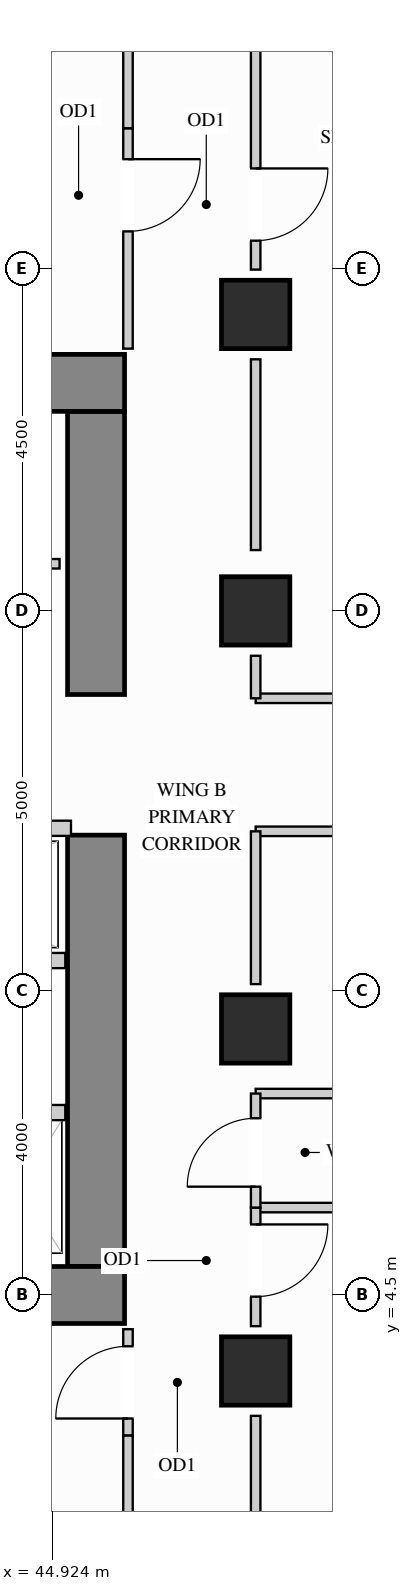
"""IFC4 building model, lengths in metres.
Left out: names, types, materials, properties, quantities, classifications, styles, units other than length and angle.
Written with IfcOpenShell. Run it as: python <this file> out.ifc"""

import sys

from ifc_helpers import new_model, si_unit, direction, frame, frame_2d, origin, origin_2d, place, context, subcontext, project, spatial, rectangle, extrude, source, transform, mapped, element, fill, save


model = new_model("IFC4")
c1 = context("Model", 3, precision=1e-05, world=origin(), true_north=direction((0.0, 1.0)))
c2 = subcontext(c1, "Body", "Model", "MODEL_VIEW")
j1 = project(units=[si_unit("LENGTHUNIT", "METRE"), si_unit("PLANEANGLEUNIT", "RADIAN")], contexts=[c1])
p1 = place(None, origin())
s1 = spatial("IfcSite", under=j1, at=p1, CompositionType="ELEMENT")
p2 = place(p1, origin())
s2 = spatial("IfcBuilding", under=s1, at=p2, CompositionType="ELEMENT")
p3 = place(p2, frame((0.0, 0.0, 127.8)))
s3 = spatial("IfcBuildingStorey", under=s2, at=p3, CompositionType="ELEMENT", Elevation=127.8)
m1 = source(origin(), c2, "Body", "SweptSolid", [
    extrude(rectangle(XDim=0.9, YDim=0.9, at=origin_2d()), origin(), (0.0, 0.0, 1.0), 3.38),
])
for number, where, z_axis, x_axis in (
    (1, (47.6, 13.5, 0.0), (0.0, 0.0, 1.0), (1.0, 0.0, 0.0)),
    (2, (47.6, 3.5, 0.0), (0.0, 0.0, 1.0), (1.0, 0.0, 0.0)),
    (3, (47.6, 8.0, 0.0), (0.0, 0.0, 1.0), (1.0, 0.0, 0.0)),
    (4, (47.6, 17.4, 0.0), (0.0, 0.0, 1.0), (1.0, 0.0, 0.0)),
):
    element("IfcColumn", number, at=place(p3, frame(where, z_axis=z_axis, x_axis=x_axis)), inside=s3, PredefinedType="COLUMN", context=c2, shape_type="MappedRepresentation", body=[
        mapped(m1, transform((0.0, 0.0, 0.0), x_axis=(1.0, 0.0, 0.0), y_axis=(0.0, 1.0, 0.0), z_axis=(0.0, 0.0, 1.0))),
    ])
m2 = source(origin(), c2, "Body", "SweptSolid", [
    extrude(rectangle(XDim=5.675, YDim=0.75, at=frame_2d((2.837, 0.0))), origin(), (0.0, 0.0, 1.0), 3.38),
])
p4 = place(p3, frame((45.5, 4.875, 0.0), z_axis=(0.0, 0.0, 1.0), x_axis=(0.0, 1.0, 0.0)))
e5 = element("IfcWall", 5, at=p4, inside=s3, PredefinedType="SHEAR", context=c2, shape_type="MappedRepresentation", body=[
    mapped(m2, transform((0.0, 0.0, 0.0), x_axis=(1.0, 0.0, 0.0), y_axis=(0.0, 1.0, 0.0), z_axis=(0.0, 0.0, 1.0))),
])
m3 = source(origin(), c2, "Body", "SweptSolid", [
    extrude(rectangle(XDim=3.725, YDim=0.75, at=frame_2d((1.863, 0.0))), origin(), (0.0, 0.0, 1.0), 3.38),
])
p5 = place(p3, frame((45.5, 12.4, 0.0), z_axis=(0.0, 0.0, 1.0), x_axis=(0.0, 1.0, 0.0)))
e6 = element("IfcWall", 6, at=p5, inside=s3, PredefinedType="SHEAR", context=c2, shape_type="MappedRepresentation", body=[
    mapped(m3, transform((0.0, 0.0, 0.0), x_axis=(1.0, 0.0, 0.0), y_axis=(0.0, 1.0, 0.0), z_axis=(0.0, 0.0, 1.0))),
])
m4 = source(origin(), c2, "Body", "SweptSolid", [
    extrude(rectangle(XDim=10.25, YDim=0.75, at=frame_2d((5.125, 0.0))), origin(), (0.0, 0.0, 1.0), 3.38),
])
for number, where, z_axis, x_axis in (
    (7, (35.625, 16.5, 0.0), (0.0, 0.0, 1.0), (1.0, 0.0, 0.0)),
    (8, (35.625, 4.5, 0.0), (0.0, 0.0, 1.0), (1.0, 0.0, 0.0)),
):
    element("IfcWall", number, at=place(p3, frame(where, z_axis=z_axis, x_axis=x_axis)), inside=s3, PredefinedType="SHEAR", context=c2, shape_type="MappedRepresentation", body=[
        mapped(m4, transform((0.0, 0.0, 0.0), x_axis=(1.0, 0.0, 0.0), y_axis=(0.0, 1.0, 0.0), z_axis=(0.0, 0.0, 1.0))),
    ])
p6 = place(p3, frame((40.75, 14.12, 0.0), z_axis=(0.0, 0.0, 1.0), x_axis=(1.0, 0.0, 0.0)))
e9 = element("IfcWall", 9, at=p6, inside=s3, PredefinedType="PARTITIONING", context=c2, shape_type="SweptSolid", body=[
    extrude(rectangle(XDim=4.27, YDim=0.125, at=frame_2d((2.135, 0.0))), origin(), (0.0, 0.0, 1.0), 3.365),
])
p7 = place(p6, frame((1.66, 0.0, 0.0)))
e10 = element("IfcOpeningElement", 10, at=p7, cuts=e9, PredefinedType="OPENING", context=c2, shape_type="SweptSolid", body=[
    extrude(rectangle(XDim=0.95, YDim=2.15, at=frame_2d((0.475, 1.075))), frame((0.0, 0.073, 0.0), z_axis=(0.0, -1.0, 0.0), x_axis=(1.0, 0.0, 0.0)), (0.0, 0.0, 1.0), 0.145),
])
m5 = source(origin(), c2, "Body", "SweptSolid", [
    extrude(rectangle(XDim=8.048, YDim=0.125, at=frame_2d((4.024, 0.0))), origin(), (0.0, 0.0, 1.0), 3.365),
])
for number, where, z_axis, x_axis in (
    (11, (47.6, 5.65, 0.0), (0.0, 0.0, 1.0), (1.0, 0.0, 0.0)),
    (12, (47.6, 7.15, 0.0), (0.0, 0.0, 1.0), (1.0, 0.0, 0.0)),
):
    element("IfcWall", number, at=place(p3, frame(where, z_axis=z_axis, x_axis=x_axis)), inside=s3, PredefinedType="PARTITIONING", context=c2, shape_type="MappedRepresentation", body=[
        mapped(m5, transform((0.0, 0.0, 0.0), x_axis=(1.0, 0.0, 0.0), y_axis=(0.0, 1.0, 0.0), z_axis=(0.0, 0.0, 1.0))),
    ])
m6 = source(origin(), c2, "Body", "SweptSolid", [
    extrude(rectangle(XDim=3.8, YDim=0.125, at=frame_2d((1.9, 0.0))), origin(), (0.0, 0.0, 1.0), 3.365),
])
p8 = place(p3, frame((47.6, 12.35, 0.0), z_axis=(0.0, 0.0, 1.0), x_axis=(1.0, 0.0, 0.0)))
e13 = element("IfcWall", 13, at=p8, inside=s3, PredefinedType="PARTITIONING", context=c2, shape_type="MappedRepresentation", body=[
    mapped(m6, transform((0.0, 0.0, 0.0), x_axis=(1.0, 0.0, 0.0), y_axis=(0.0, 1.0, 0.0), z_axis=(0.0, 0.0, 1.0))),
])
p9 = place(p3, frame((47.6, 10.6, 0.0), z_axis=(0.0, 0.0, 1.0), x_axis=(1.0, 0.0, 0.0)))
e14 = element("IfcWall", 14, at=p9, inside=s3, PredefinedType="PARTITIONING", context=c2, shape_type="SweptSolid", body=[
    extrude(rectangle(XDim=3.8, YDim=0.125, at=frame_2d((1.9, 0.0))), origin(), (0.0, 0.0, 1.0), 2.677),
])
p10 = place(p9, frame((1.425, 0.0, 0.0)))
e15 = element("IfcOpeningElement", 15, at=p10, cuts=e14, PredefinedType="OPENING", context=c2, shape_type="SweptSolid", body=[
    extrude(rectangle(XDim=0.95, YDim=2.15, at=frame_2d((0.475, 1.075))), frame((0.0, 0.073, 0.0), z_axis=(0.0, -1.0, 0.0), x_axis=(1.0, 0.0, 0.0)), (0.0, 0.0, 1.0), 0.145),
])
p11 = place(p3, frame((47.6, 4.09, 0.0), z_axis=(0.0, 0.0, 1.0), x_axis=(0.0, 1.0, 0.0)))
e16 = element("IfcWall", 16, at=p11, inside=s3, PredefinedType="PARTITIONING", context=c2, shape_type="SweptSolid", body=[
    extrude(rectangle(XDim=1.56, YDim=0.125, at=frame_2d((0.78, 0.0))), origin(), (0.0, 0.0, 1.0), 2.677),
])
p12 = place(p11, frame((0.388, 0.0, 0.0)))
e17 = element("IfcOpeningElement", 17, at=p12, cuts=e16, PredefinedType="OPENING", context=c2, shape_type="SweptSolid", body=[
    extrude(rectangle(XDim=0.95, YDim=2.15, at=frame_2d((0.475, 1.075))), frame((0.0, 0.073, 0.0), z_axis=(0.0, -1.0, 0.0), x_axis=(1.0, 0.0, 0.0)), (0.0, 0.0, 1.0), 0.145),
])
m7 = source(origin(), c2, "Body", "SweptSolid", [
    extrude(rectangle(XDim=1.72, YDim=0.125, at=frame_2d((0.86, 0.0))), origin(), (0.0, 0.0, 1.0), 2.677),
])
p13 = place(p3, frame((47.6, 1.19, 0.0), z_axis=(0.0, 0.0, 1.0), x_axis=(0.0, 1.0, 0.0)))
e18 = element("IfcWall", 18, at=p13, inside=s3, PredefinedType="PARTITIONING", context=c2, shape_type="MappedRepresentation", body=[
    mapped(m7, transform((0.0, 0.0, 0.0), x_axis=(1.0, 0.0, 0.0), y_axis=(0.0, 1.0, 0.0), z_axis=(0.0, 0.0, 1.0))),
])
m8 = source(origin(), c2, "Body", "SweptSolid", [
    extrude(rectangle(XDim=2.01, YDim=0.125, at=frame_2d((1.005, 0.0))), origin(), (0.0, 0.0, 1.0), 2.677),
])
p14 = place(p3, frame((47.6, 8.59, 0.0), z_axis=(0.0, 0.0, 1.0), x_axis=(0.0, 1.0, 0.0)))
e19 = element("IfcWall", 19, at=p14, inside=s3, PredefinedType="PARTITIONING", context=c2, shape_type="MappedRepresentation", body=[
    mapped(m8, transform((0.0, 0.0, 0.0), x_axis=(1.0, 0.0, 0.0), y_axis=(0.0, 1.0, 0.0), z_axis=(0.0, 0.0, 1.0))),
])
m9 = source(origin(), c2, "Body", "SweptSolid", [
    extrude(rectangle(XDim=2.51, YDim=0.125, at=frame_2d((1.255, 0.0))), origin(), (0.0, 0.0, 1.0), 2.677),
])
p15 = place(p3, frame((47.6, 14.3, 0.0), z_axis=(0.0, 0.0, 1.0), x_axis=(0.0, 1.0, 0.0)))
e20 = element("IfcWall", 20, at=p15, inside=s3, PredefinedType="PARTITIONING", context=c2, shape_type="MappedRepresentation", body=[
    mapped(m9, transform((0.0, 0.0, 0.0), x_axis=(1.0, 0.0, 0.0), y_axis=(0.0, 1.0, 0.0), z_axis=(0.0, 0.0, 1.0))),
])
p16 = place(p3, frame((47.6, 17.99, 0.0), z_axis=(0.0, 0.0, 1.0), x_axis=(0.0, 1.0, 0.0)))
e21 = element("IfcWall", 21, at=p16, inside=s3, PredefinedType="PARTITIONING", context=c2, shape_type="SweptSolid", body=[
    extrude(rectangle(XDim=3.32, YDim=0.125, at=frame_2d((1.66, 0.0))), origin(), (0.0, 0.0, 1.0), 2.677),
])
p17 = place(p16, frame((0.381, 0.0, 0.0)))
e22 = element("IfcOpeningElement", 22, at=p17, cuts=e21, PredefinedType="OPENING", context=c2, shape_type="SweptSolid", body=[
    extrude(rectangle(XDim=0.95, YDim=2.15, at=frame_2d((0.475, 1.075))), frame((0.0, 0.073, 0.0), z_axis=(0.0, -1.0, 0.0), x_axis=(1.0, 0.0, 0.0)), (0.0, 0.0, 1.0), 0.145),
])
m10 = source(origin(), c2, "Body", "SweptSolid", [
    extrude(rectangle(XDim=0.56, YDim=0.125, at=frame_2d((0.28, 0.0))), origin(), (0.0, 0.0, 1.0), 2.677),
])
p18 = place(p3, frame((47.6, 12.35, 0.0), z_axis=(0.0, 0.0, 1.0), x_axis=(0.0, 1.0, 0.0)))
e23 = element("IfcWall", 23, at=p18, inside=s3, PredefinedType="PARTITIONING", context=c2, shape_type="MappedRepresentation", body=[
    mapped(m10, transform((0.0, 0.0, 0.0), x_axis=(1.0, 0.0, 0.0), y_axis=(0.0, 1.0, 0.0), z_axis=(0.0, 0.0, 1.0))),
])
p19 = place(p3, frame((47.6, 5.65, 0.0), z_axis=(0.0, 0.0, 1.0), x_axis=(0.0, 1.0, 0.0)))
e24 = element("IfcWall", 24, at=p19, inside=s3, PredefinedType="PARTITIONING", context=c2, shape_type="SweptSolid", body=[
    extrude(rectangle(XDim=1.5, YDim=0.125, at=frame_2d((0.75, 0.0))), origin(), (0.0, 0.0, 1.0), 2.677),
])
p20 = place(p19, frame((0.275, 0.0, 0.0)))
e25 = element("IfcOpeningElement", 25, at=p20, cuts=e24, PredefinedType="OPENING", context=c2, shape_type="SweptSolid", body=[
    extrude(rectangle(XDim=0.9, YDim=2.15, at=frame_2d((0.45, 1.075))), frame((0.0, 0.073, 0.0), z_axis=(0.0, -1.0, 0.0), x_axis=(1.0, 0.0, 0.0)), (0.0, 0.0, 1.0), 0.145),
])
p21 = place(p3, frame((45.92, 16.95, 0.0), z_axis=(0.0, 0.0, 1.0), x_axis=(0.0, 1.0, 0.0)))
e26 = element("IfcWall", 26, at=p21, inside=s3, PredefinedType="PARTITIONING", context=c2, shape_type="SweptSolid", body=[
    extrude(rectangle(XDim=2.9, YDim=0.125, at=frame_2d((1.45, 0.0))), origin(), (0.0, 0.0, 1.0), 3.365),
])
p22 = place(p21, frame((1.543, 0.0, 0.0)))
e27 = element("IfcOpeningElement", 27, at=p22, cuts=e26, PredefinedType="OPENING", context=c2, shape_type="SweptSolid", body=[
    extrude(rectangle(XDim=0.95, YDim=2.15, at=frame_2d((0.475, 1.075))), frame((0.0, 0.073, 0.0), z_axis=(0.0, -1.0, 0.0), x_axis=(1.0, 0.0, 0.0)), (0.0, 0.0, 1.0), 0.145),
])
m11 = source(origin(), c2, "Body", "SweptSolid", [
    extrude(rectangle(XDim=2.298, YDim=0.125, at=frame_2d((1.149, 0.0))), origin(), (0.0, 0.0, 1.0), 3.365),
])
p23 = place(p3, frame((45.92, 19.85, 0.0), z_axis=(0.0, 0.0, 1.0), x_axis=(0.0, 1.0, 0.0)))
e28 = element("IfcWall", 28, at=p23, inside=s3, PredefinedType="PARTITIONING", context=c2, shape_type="MappedRepresentation", body=[
    mapped(m11, transform((0.0, 0.0, 0.0), x_axis=(1.0, 0.0, 0.0), y_axis=(0.0, 1.0, 0.0), z_axis=(0.0, 0.0, 1.0))),
])
p24 = place(p3, frame((45.92, 2.65, 0.0), z_axis=(0.0, 0.0, 1.0), x_axis=(0.0, 1.0, 0.0)))
e29 = element("IfcWall", 29, at=p24, inside=s3, PredefinedType="PARTITIONING", context=c2, shape_type="SweptSolid", body=[
    extrude(rectangle(XDim=1.4, YDim=0.125, at=frame_2d((0.7, 0.0))), origin(), (0.0, 0.0, 1.0), 3.365),
])
p25 = place(p24, frame((0.225, 0.0, 0.0)))
e30 = element("IfcOpeningElement", 30, at=p25, cuts=e29, PredefinedType="OPENING", context=c2, shape_type="SweptSolid", body=[
    extrude(rectangle(XDim=0.95, YDim=2.15, at=frame_2d((0.475, 1.075))), frame((0.0, 0.073, 0.0), z_axis=(0.0, -1.0, 0.0), x_axis=(1.0, 0.0, 0.0)), (0.0, 0.0, 1.0), 0.145),
])
p26 = place(p3, frame((45.92, 0.352, 0.0), z_axis=(0.0, 0.0, 1.0), x_axis=(0.0, 1.0, 0.0)))
e31 = element("IfcWall", 31, at=p26, inside=s3, PredefinedType="PARTITIONING", context=c2, shape_type="MappedRepresentation", body=[
    mapped(m11, transform((0.0, 0.0, 0.0), x_axis=(1.0, 0.0, 0.0), y_axis=(0.0, 1.0, 0.0), z_axis=(0.0, 0.0, 1.0))),
])
m12 = source(origin(), c2, "Body", "SweptSolid", [
    extrude(rectangle(XDim=1.245, YDim=0.2, at=frame_2d((0.623, 0.0))), origin(), (0.0, 0.0, 1.0), 3.365),
])
p27 = place(p3, frame((43.85, 6.9, 0.0), z_axis=(0.0, 0.0, 1.0), x_axis=(1.0, 0.0, 0.0)))
e32 = element("IfcWall", 32, at=p27, inside=s3, PredefinedType="PARTITIONING", context=c2, shape_type="MappedRepresentation", body=[
    mapped(m12, transform((0.0, 0.0, 0.0), x_axis=(1.0, 0.0, 0.0), y_axis=(0.0, 1.0, 0.0), z_axis=(0.0, 0.0, 1.0))),
])
m13 = source(origin(), c2, "Body", "SweptSolid", [
    extrude(rectangle(XDim=3.49, YDim=0.2, at=frame_2d((1.745, 0.0))), origin(), (0.0, 0.0, 1.0), 3.365),
])
p28 = place(p3, frame((41.68, 10.64, 0.0), z_axis=(0.0, 0.0, 1.0), x_axis=(1.0, 0.0, 0.0)))
e33 = element("IfcWall", 33, at=p28, inside=s3, PredefinedType="PARTITIONING", context=c2, shape_type="MappedRepresentation", body=[
    mapped(m13, transform((0.0, 0.0, 0.0), x_axis=(1.0, 0.0, 0.0), y_axis=(0.0, 1.0, 0.0), z_axis=(0.0, 0.0, 1.0))),
])
m14 = source(origin(), c2, "Body", "SweptSolid", [
    extrude(rectangle(XDim=3.415, YDim=0.2, at=frame_2d((1.708, 0.0))), origin(), (0.0, 0.0, 1.0), 3.365),
])
p29 = place(p3, frame((41.68, 8.9, 0.0), z_axis=(0.0, 0.0, 1.0), x_axis=(1.0, 0.0, 0.0)))
e34 = element("IfcWall", 34, at=p29, inside=s3, PredefinedType="PARTITIONING", context=c2, shape_type="MappedRepresentation", body=[
    mapped(m14, transform((0.0, 0.0, 0.0), x_axis=(1.0, 0.0, 0.0), y_axis=(0.0, 1.0, 0.0), z_axis=(0.0, 0.0, 1.0))),
])
m15 = source(origin(), c2, "Body", "SweptSolid", [
    extrude(rectangle(XDim=0.95, YDim=2.15, at=frame_2d((0.475, 1.075))), frame((0.0, 0.025, 0.0), z_axis=(0.0, -1.0, 0.0), x_axis=(1.0, 0.0, 0.0)), (0.0, 0.0, 1.0), 0.05),
])
p30 = place(p22, origin())
e35 = element("IfcDoor", 35, at=p30, inside=s3, OperationType="SINGLE_SWING_RIGHT", PredefinedType="DOOR", context=c2, shape_type="MappedRepresentation", body=[
    mapped(m15, transform((0.0, 0.0, 0.0), x_axis=(1.0, 0.0, 0.0), y_axis=(0.0, 1.0, 0.0), z_axis=(0.0, 0.0, 1.0))),
])
fill(e27, e35)
p31 = place(p25, origin())
e36 = element("IfcDoor", 36, at=p31, inside=s3, OperationType="SINGLE_SWING_LEFT", PredefinedType="DOOR", context=c2, shape_type="MappedRepresentation", body=[
    mapped(m15, transform((0.0, 0.0, 0.0), x_axis=(1.0, 0.0, 0.0), y_axis=(0.0, 1.0, 0.0), z_axis=(0.0, 0.0, 1.0))),
])
fill(e30, e36)
p32 = place(p12, origin())
e37 = element("IfcDoor", 37, at=p32, inside=s3, OperationType="SINGLE_SWING_RIGHT", PredefinedType="DOOR", context=c2, shape_type="MappedRepresentation", body=[
    mapped(m15, transform((0.0, 0.0, 0.0), x_axis=(1.0, 0.0, 0.0), y_axis=(0.0, 1.0, 0.0), z_axis=(0.0, 0.0, 1.0))),
])
fill(e17, e37)
p33 = place(p17, origin())
e38 = element("IfcDoor", 38, at=p33, inside=s3, OperationType="SINGLE_SWING_RIGHT", PredefinedType="DOOR", context=c2, shape_type="MappedRepresentation", body=[
    mapped(m15, transform((0.0, 0.0, 0.0), x_axis=(1.0, 0.0, 0.0), y_axis=(0.0, 1.0, 0.0), z_axis=(0.0, 0.0, 1.0))),
])
fill(e22, e38)
m16 = source(origin(), c2, "Body", "SweptSolid", [
    extrude(rectangle(XDim=0.9, YDim=2.15, at=frame_2d((0.45, 1.075))), frame((0.0, 0.025, 0.0), z_axis=(0.0, -1.0, 0.0), x_axis=(1.0, 0.0, 0.0)), (0.0, 0.0, 1.0), 0.05),
])
p34 = place(p20, origin())
e39 = element("IfcDoor", 39, at=p34, inside=s3, OperationType="SINGLE_SWING_LEFT", PredefinedType="DOOR", context=c2, shape_type="MappedRepresentation", body=[
    mapped(m16, transform((0.0, 0.0, 0.0), x_axis=(1.0, 0.0, 0.0), y_axis=(0.0, 1.0, 0.0), z_axis=(0.0, 0.0, 1.0))),
])
fill(e25, e39)
save(model, sys.argv[1])
